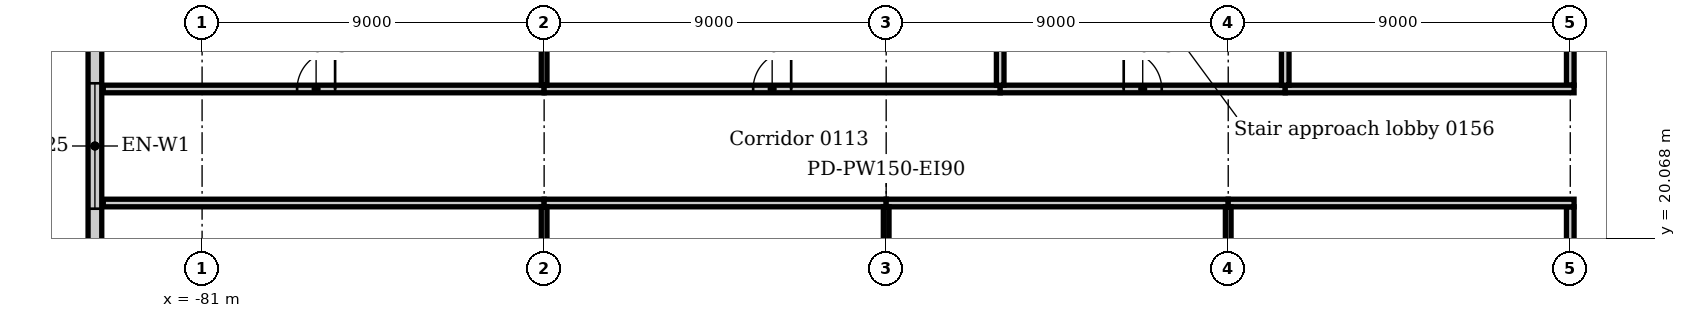
"""IFC4 building model, lengths in metres.
Left out: names, types, materials, properties, quantities, classifications, styles, units other than length and angle.
Written with IfcOpenShell. Run it as: python <this file> out.ifc"""

import sys

from ifc_helpers import new_model, si_unit, direction, frame, frame_2d, origin, place, context, subcontext, project, spatial, rectangle, extrude, element, fill, save


model = new_model("IFC4")
c1 = context("Model", 3, precision=1e-05, world=origin(), true_north=direction((0.0, 1.0)))
c2 = subcontext(c1, "Body", "Model", "MODEL_VIEW")
j1 = project(units=[si_unit("LENGTHUNIT", "METRE"), si_unit("PLANEANGLEUNIT", "RADIAN")], contexts=[c1])
p1 = place(None, origin())
s1 = spatial("IfcSite", under=j1, at=p1, CompositionType="ELEMENT")
p2 = place(p1, origin())
s2 = spatial("IfcBuilding", under=s1, at=p2, CompositionType="ELEMENT")
p3 = place(p2, frame((0.0, 0.0, 6.0)))
s3 = spatial("IfcBuildingStorey", under=s2, at=p3, CompositionType="ELEMENT", Elevation=6.0)
p4 = place(p3, frame((-83.82, 54.0, 0.0), z_axis=(0.0, 0.0, 1.0), x_axis=(0.0, -1.0, 0.0)))
e1 = element("IfcWall", 1, at=p4, inside=s3, PredefinedType="STANDARD", context=c2, shape_type="SweptSolid", body=[
    extrude(rectangle(XDim=63.0, YDim=0.36, at=frame_2d((31.5, 0.0))), origin(), (0.0, 0.0, 1.0), 4.7),
])
p5 = place(p4, frame((2.85, 0.0, 0.9)))
e2 = element("IfcOpeningElement", 2, at=p5, cuts=e1, PredefinedType="OPENING", context=c2, shape_type="SweptSolid", body=[
    extrude(rectangle(XDim=3.3, YDim=2.4, at=frame_2d((1.65, 1.2))), frame((0.0, 0.19, 0.0), z_axis=(0.0, -1.0, 0.0), x_axis=(1.0, 0.0, 0.0)), (0.0, 0.0, 1.0), 0.38),
])
p6 = place(p4, frame((7.35, 0.0, 0.9)))
e3 = element("IfcOpeningElement", 3, at=p6, cuts=e1, PredefinedType="OPENING", context=c2, shape_type="SweptSolid", body=[
    extrude(rectangle(XDim=3.3, YDim=2.4, at=frame_2d((1.65, 1.2))), frame((0.0, 0.19, 0.0), z_axis=(0.0, -1.0, 0.0), x_axis=(1.0, 0.0, 0.0)), (0.0, 0.0, 1.0), 0.38),
])
p7 = place(p4, frame((11.85, 0.0, 0.9)))
e4 = element("IfcOpeningElement", 4, at=p7, cuts=e1, PredefinedType="OPENING", context=c2, shape_type="SweptSolid", body=[
    extrude(rectangle(XDim=3.3, YDim=2.4, at=frame_2d((1.65, 1.2))), frame((0.0, 0.19, 0.0), z_axis=(0.0, -1.0, 0.0), x_axis=(1.0, 0.0, 0.0)), (0.0, 0.0, 1.0), 0.38),
])
p8 = place(p4, frame((16.35, 0.0, 0.9)))
e5 = element("IfcOpeningElement", 5, at=p8, cuts=e1, PredefinedType="OPENING", context=c2, shape_type="SweptSolid", body=[
    extrude(rectangle(XDim=3.3, YDim=2.4, at=frame_2d((1.65, 1.2))), frame((0.0, 0.19, 0.0), z_axis=(0.0, -1.0, 0.0), x_axis=(1.0, 0.0, 0.0)), (0.0, 0.0, 1.0), 0.38),
])
p9 = place(p4, frame((20.85, 0.0, 0.9)))
e6 = element("IfcOpeningElement", 6, at=p9, cuts=e1, PredefinedType="OPENING", context=c2, shape_type="SweptSolid", body=[
    extrude(rectangle(XDim=3.3, YDim=2.4, at=frame_2d((1.65, 1.2))), frame((0.0, 0.19, 0.0), z_axis=(0.0, -1.0, 0.0), x_axis=(1.0, 0.0, 0.0)), (0.0, 0.0, 1.0), 0.38),
])
p10 = place(p4, frame((25.35, 0.0, 0.9)))
e7 = element("IfcOpeningElement", 7, at=p10, cuts=e1, PredefinedType="OPENING", context=c2, shape_type="SweptSolid", body=[
    extrude(rectangle(XDim=3.3, YDim=2.4, at=frame_2d((1.65, 1.2))), frame((0.0, 0.19, 0.0), z_axis=(0.0, -1.0, 0.0), x_axis=(1.0, 0.0, 0.0)), (0.0, 0.0, 1.0), 0.38),
])
p11 = place(p4, frame((29.85, 0.0, 0.9)))
e8 = element("IfcOpeningElement", 8, at=p11, cuts=e1, PredefinedType="OPENING", context=c2, shape_type="SweptSolid", body=[
    extrude(rectangle(XDim=3.3, YDim=2.4, at=frame_2d((1.65, 1.2))), frame((0.0, 0.19, 0.0), z_axis=(0.0, -1.0, 0.0), x_axis=(1.0, 0.0, 0.0)), (0.0, 0.0, 1.0), 0.38),
])
p12 = place(p4, frame((34.35, 0.0, 0.9)))
e9 = element("IfcOpeningElement", 9, at=p12, cuts=e1, PredefinedType="OPENING", context=c2, shape_type="SweptSolid", body=[
    extrude(rectangle(XDim=3.3, YDim=2.4, at=frame_2d((1.65, 1.2))), frame((0.0, 0.19, 0.0), z_axis=(0.0, -1.0, 0.0), x_axis=(1.0, 0.0, 0.0)), (0.0, 0.0, 1.0), 0.38),
])
p13 = place(p4, frame((38.85, 0.0, 0.9)))
e10 = element("IfcOpeningElement", 10, at=p13, cuts=e1, PredefinedType="OPENING", context=c2, shape_type="SweptSolid", body=[
    extrude(rectangle(XDim=3.3, YDim=2.4, at=frame_2d((1.65, 1.2))), frame((0.0, 0.19, 0.0), z_axis=(0.0, -1.0, 0.0), x_axis=(1.0, 0.0, 0.0)), (0.0, 0.0, 1.0), 0.38),
])
p14 = place(p4, frame((43.35, 0.0, 0.9)))
e11 = element("IfcOpeningElement", 11, at=p14, cuts=e1, PredefinedType="OPENING", context=c2, shape_type="SweptSolid", body=[
    extrude(rectangle(XDim=3.3, YDim=2.4, at=frame_2d((1.65, 1.2))), frame((0.0, 0.19, 0.0), z_axis=(0.0, -1.0, 0.0), x_axis=(1.0, 0.0, 0.0)), (0.0, 0.0, 1.0), 0.38),
])
p15 = place(p4, frame((47.85, 0.0, 0.9)))
e12 = element("IfcOpeningElement", 12, at=p15, cuts=e1, PredefinedType="OPENING", context=c2, shape_type="SweptSolid", body=[
    extrude(rectangle(XDim=3.3, YDim=2.4, at=frame_2d((1.65, 1.2))), frame((0.0, 0.19, 0.0), z_axis=(0.0, -1.0, 0.0), x_axis=(1.0, 0.0, 0.0)), (0.0, 0.0, 1.0), 0.38),
])
p16 = place(p4, frame((52.35, 0.0, 0.9)))
e13 = element("IfcOpeningElement", 13, at=p16, cuts=e1, PredefinedType="OPENING", context=c2, shape_type="SweptSolid", body=[
    extrude(rectangle(XDim=3.3, YDim=2.4, at=frame_2d((1.65, 1.2))), frame((0.0, 0.19, 0.0), z_axis=(0.0, -1.0, 0.0), x_axis=(1.0, 0.0, 0.0)), (0.0, 0.0, 1.0), 0.38),
])
p17 = place(p4, frame((56.85, 0.0, 0.9)))
e14 = element("IfcOpeningElement", 14, at=p17, cuts=e1, PredefinedType="OPENING", context=c2, shape_type="SweptSolid", body=[
    extrude(rectangle(XDim=3.3, YDim=2.4, at=frame_2d((1.65, 1.2))), frame((0.0, 0.19, 0.0), z_axis=(0.0, -1.0, 0.0), x_axis=(1.0, 0.0, 0.0)), (0.0, 0.0, 1.0), 0.38),
])
for number, where, z_axis, x_axis in (
    (15, (-45.0, 18.42, 0.0), (0.0, 0.0, 1.0), (0.0, 1.0, 0.0)),
    (16, (-45.0, 24.1, 0.0), (0.0, 0.0, 1.0), (0.0, 1.0, 0.0)),
):
    element("IfcWall", number, at=place(p3, frame(where, z_axis=z_axis, x_axis=x_axis)), inside=s3, PredefinedType="PARTITIONING", context=c2, shape_type="SweptSolid", body=[
        extrude(rectangle(XDim=2.48, YDim=0.2, at=frame_2d((1.24, 0.0))), origin(), (0.0, 0.0, 1.0), 4.7),
    ])
p18 = place(p3, frame((-83.6, 21.0, 0.0), z_axis=(0.0, 0.0, 1.0), x_axis=(1.0, 0.0, 0.0)))
e17 = element("IfcWall", 17, at=p18, inside=s3, PredefinedType="PARTITIONING", context=c2, shape_type="SweptSolid", body=[
    extrude(rectangle(XDim=11.6, YDim=0.2, at=frame_2d((5.8, 0.0))), origin(), (0.0, 0.0, 1.0), 4.7),
])
for number, where, z_axis, x_axis in (
    (18, (-72.0, 21.0, 0.0), (0.0, 0.0, 1.0), (1.0, 0.0, 0.0)),
    (19, (-63.0, 21.0, 0.0), (0.0, 0.0, 1.0), (1.0, 0.0, 0.0)),
):
    element("IfcWall", number, at=place(p3, frame(where, z_axis=z_axis, x_axis=x_axis)), inside=s3, PredefinedType="PARTITIONING", context=c2, shape_type="SweptSolid", body=[
        extrude(rectangle(XDim=9.0, YDim=0.2, at=frame_2d((4.5, 0.0))), origin(), (0.0, 0.0, 1.0), 4.7),
    ])
p19 = place(p3, frame((-54.0, 21.0, 0.0), z_axis=(0.0, 0.0, 1.0), x_axis=(1.0, 0.0, 0.0)))
e20 = element("IfcWall", 20, at=p19, inside=s3, PredefinedType="PARTITIONING", context=c2, shape_type="SweptSolid", body=[
    extrude(rectangle(XDim=9.1, YDim=0.2, at=frame_2d((4.55, 0.0))), origin(), (0.0, 0.0, 1.0), 4.7),
])
p20 = place(p3, frame((-83.6, 24.0, 0.0), z_axis=(0.0, 0.0, 1.0), x_axis=(1.0, 0.0, 0.0)))
e21 = element("IfcWall", 21, at=p20, inside=s3, PredefinedType="PARTITIONING", context=c2, shape_type="SweptSolid", body=[
    extrude(rectangle(XDim=11.6, YDim=0.2, at=frame_2d((5.8, 0.0))), origin(), (0.0, 0.0, 1.0), 4.7),
])
p21 = place(p20, frame((5.1, 0.0, 0.0)))
e22 = element("IfcOpeningElement", 22, at=p21, cuts=e21, PredefinedType="OPENING", context=c2, shape_type="SweptSolid", body=[
    extrude(rectangle(XDim=1.0, YDim=2.1, at=frame_2d((0.5, 1.05))), frame((0.0, 0.11, 0.0), z_axis=(0.0, -1.0, 0.0), x_axis=(1.0, 0.0, 0.0)), (0.0, 0.0, 1.0), 0.22),
])
p22 = place(p3, frame((-72.0, 24.0, 0.0), z_axis=(0.0, 0.0, 1.0), x_axis=(1.0, 0.0, 0.0)))
e23 = element("IfcWall", 23, at=p22, inside=s3, PredefinedType="PARTITIONING", context=c2, shape_type="SweptSolid", body=[
    extrude(rectangle(XDim=12.0, YDim=0.2, at=frame_2d((6.0, 0.0))), origin(), (0.0, 0.0, 1.0), 4.7),
])
p23 = place(p22, frame((5.5, 0.0, 0.0)))
e24 = element("IfcOpeningElement", 24, at=p23, cuts=e23, PredefinedType="OPENING", context=c2, shape_type="SweptSolid", body=[
    extrude(rectangle(XDim=1.0, YDim=2.1, at=frame_2d((0.5, 1.05))), frame((0.0, 0.11, 0.0), z_axis=(0.0, -1.0, 0.0), x_axis=(1.0, 0.0, 0.0)), (0.0, 0.0, 1.0), 0.22),
])
p24 = place(p3, frame((-60.0, 24.0, 0.0), z_axis=(0.0, 0.0, 1.0), x_axis=(1.0, 0.0, 0.0)))
e25 = element("IfcWall", 25, at=p24, inside=s3, PredefinedType="PARTITIONING", context=c2, shape_type="SweptSolid", body=[
    extrude(rectangle(XDim=7.5, YDim=0.2, at=frame_2d((3.75, 0.0))), origin(), (0.0, 0.0, 1.0), 4.7),
])
p25 = place(p24, frame((3.25, 0.0, 0.0)))
e26 = element("IfcOpeningElement", 26, at=p25, cuts=e25, PredefinedType="OPENING", context=c2, shape_type="SweptSolid", body=[
    extrude(rectangle(XDim=1.0, YDim=2.1, at=frame_2d((0.5, 1.05))), frame((0.0, 0.11, 0.0), z_axis=(0.0, -1.0, 0.0), x_axis=(1.0, 0.0, 0.0)), (0.0, 0.0, 1.0), 0.22),
])
p26 = place(p3, frame((-52.5, 24.0, 0.0), z_axis=(0.0, 0.0, 1.0), x_axis=(1.0, 0.0, 0.0)))
e27 = element("IfcWall", 27, at=p26, inside=s3, PredefinedType="PARTITIONING", context=c2, shape_type="SweptSolid", body=[
    extrude(rectangle(XDim=7.6, YDim=0.2, at=frame_2d((3.8, 0.0))), origin(), (0.0, 0.0, 1.0), 4.7),
])
p27 = place(p3, frame((-72.0, 3.7, 0.0), z_axis=(0.0, 0.0, 1.0), x_axis=(0.0, 1.0, 0.0)))
e28 = element("IfcWall", 28, at=p27, inside=s3, PredefinedType="PARTITIONING", context=c2, shape_type="SweptSolid", body=[
    extrude(rectangle(XDim=17.2, YDim=0.15, at=frame_2d((8.6, 0.0))), origin(), (0.0, 0.0, 1.0), 4.7),
])
for number, where, z_axis, x_axis in (
    (29, (-63.0, 18.42, 0.0), (0.0, 0.0, 1.0), (0.0, 1.0, 0.0)),
    (30, (-54.0, 18.42, 0.0), (0.0, 0.0, 1.0), (0.0, 1.0, 0.0)),
):
    element("IfcWall", number, at=place(p3, frame(where, z_axis=z_axis, x_axis=x_axis)), inside=s3, PredefinedType="PARTITIONING", context=c2, shape_type="SweptSolid", body=[
        extrude(rectangle(XDim=2.48, YDim=0.15, at=frame_2d((1.24, 0.0))), origin(), (0.0, 0.0, 1.0), 4.7),
    ])
p28 = place(p3, frame((-72.0, 24.1, 0.0), z_axis=(0.0, 0.0, 1.0), x_axis=(0.0, 1.0, 0.0)))
e31 = element("IfcWall", 31, at=p28, inside=s3, PredefinedType="PARTITIONING", context=c2, shape_type="SweptSolid", body=[
    extrude(rectangle(XDim=17.45, YDim=0.15, at=frame_2d((8.725, 0.0))), origin(), (0.0, 0.0, 1.0), 4.7),
])
for number, where, z_axis, x_axis in (
    (32, (-60.0, 24.1, 0.0), (0.0, 0.0, 1.0), (0.0, 1.0, 0.0)),
    (33, (-52.5, 24.1, 0.0), (0.0, 0.0, 1.0), (0.0, 1.0, 0.0)),
):
    element("IfcWall", number, at=place(p3, frame(where, z_axis=z_axis, x_axis=x_axis)), inside=s3, PredefinedType="PARTITIONING", context=c2, shape_type="SweptSolid", body=[
        extrude(rectangle(XDim=5.15, YDim=0.2, at=frame_2d((2.575, 0.0))), origin(), (0.0, 0.0, 1.0), 4.7),
    ])
p29 = place(p11, origin())
e34 = element("IfcWindow", 34, at=p29, inside=s3, PartitioningType="SINGLE_PANEL", PredefinedType="WINDOW", context=c2, shape_type="SweptSolid", body=[
    extrude(rectangle(XDim=3.3, YDim=2.4, at=frame_2d((1.65, 1.2))), frame((0.0, 0.13, 0.0), z_axis=(0.0, -1.0, 0.0), x_axis=(1.0, 0.0, 0.0)), (0.0, 0.0, 1.0), 0.06),
])
fill(e8, e34)
p30 = place(p21, origin())
e35 = element("IfcDoor", 35, at=p30, inside=s3, OperationType="SINGLE_SWING_RIGHT", PredefinedType="DOOR", context=c2, shape_type="SweptSolid", body=[
    extrude(rectangle(XDim=1.0, YDim=2.1, at=frame_2d((0.5, 1.05))), frame((0.0, 0.025, 0.0), z_axis=(0.0, -1.0, 0.0), x_axis=(1.0, 0.0, 0.0)), (0.0, 0.0, 1.0), 0.05),
])
fill(e22, e35)
p31 = place(p23, origin())
e36 = element("IfcDoor", 36, at=p31, inside=s3, OperationType="SINGLE_SWING_RIGHT", PredefinedType="DOOR", context=c2, shape_type="SweptSolid", body=[
    extrude(rectangle(XDim=1.0, YDim=2.1, at=frame_2d((0.5, 1.05))), frame((0.0, 0.025, 0.0), z_axis=(0.0, -1.0, 0.0), x_axis=(1.0, 0.0, 0.0)), (0.0, 0.0, 1.0), 0.05),
])
fill(e24, e36)
p32 = place(p25, origin())
e37 = element("IfcDoor", 37, at=p32, inside=s3, OperationType="SINGLE_SWING_LEFT", PredefinedType="DOOR", context=c2, shape_type="SweptSolid", body=[
    extrude(rectangle(XDim=1.0, YDim=2.1, at=frame_2d((0.5, 1.05))), frame((0.0, 0.025, 0.0), z_axis=(0.0, -1.0, 0.0), x_axis=(1.0, 0.0, 0.0)), (0.0, 0.0, 1.0), 0.05),
])
fill(e26, e37)
save(model, sys.argv[1])
